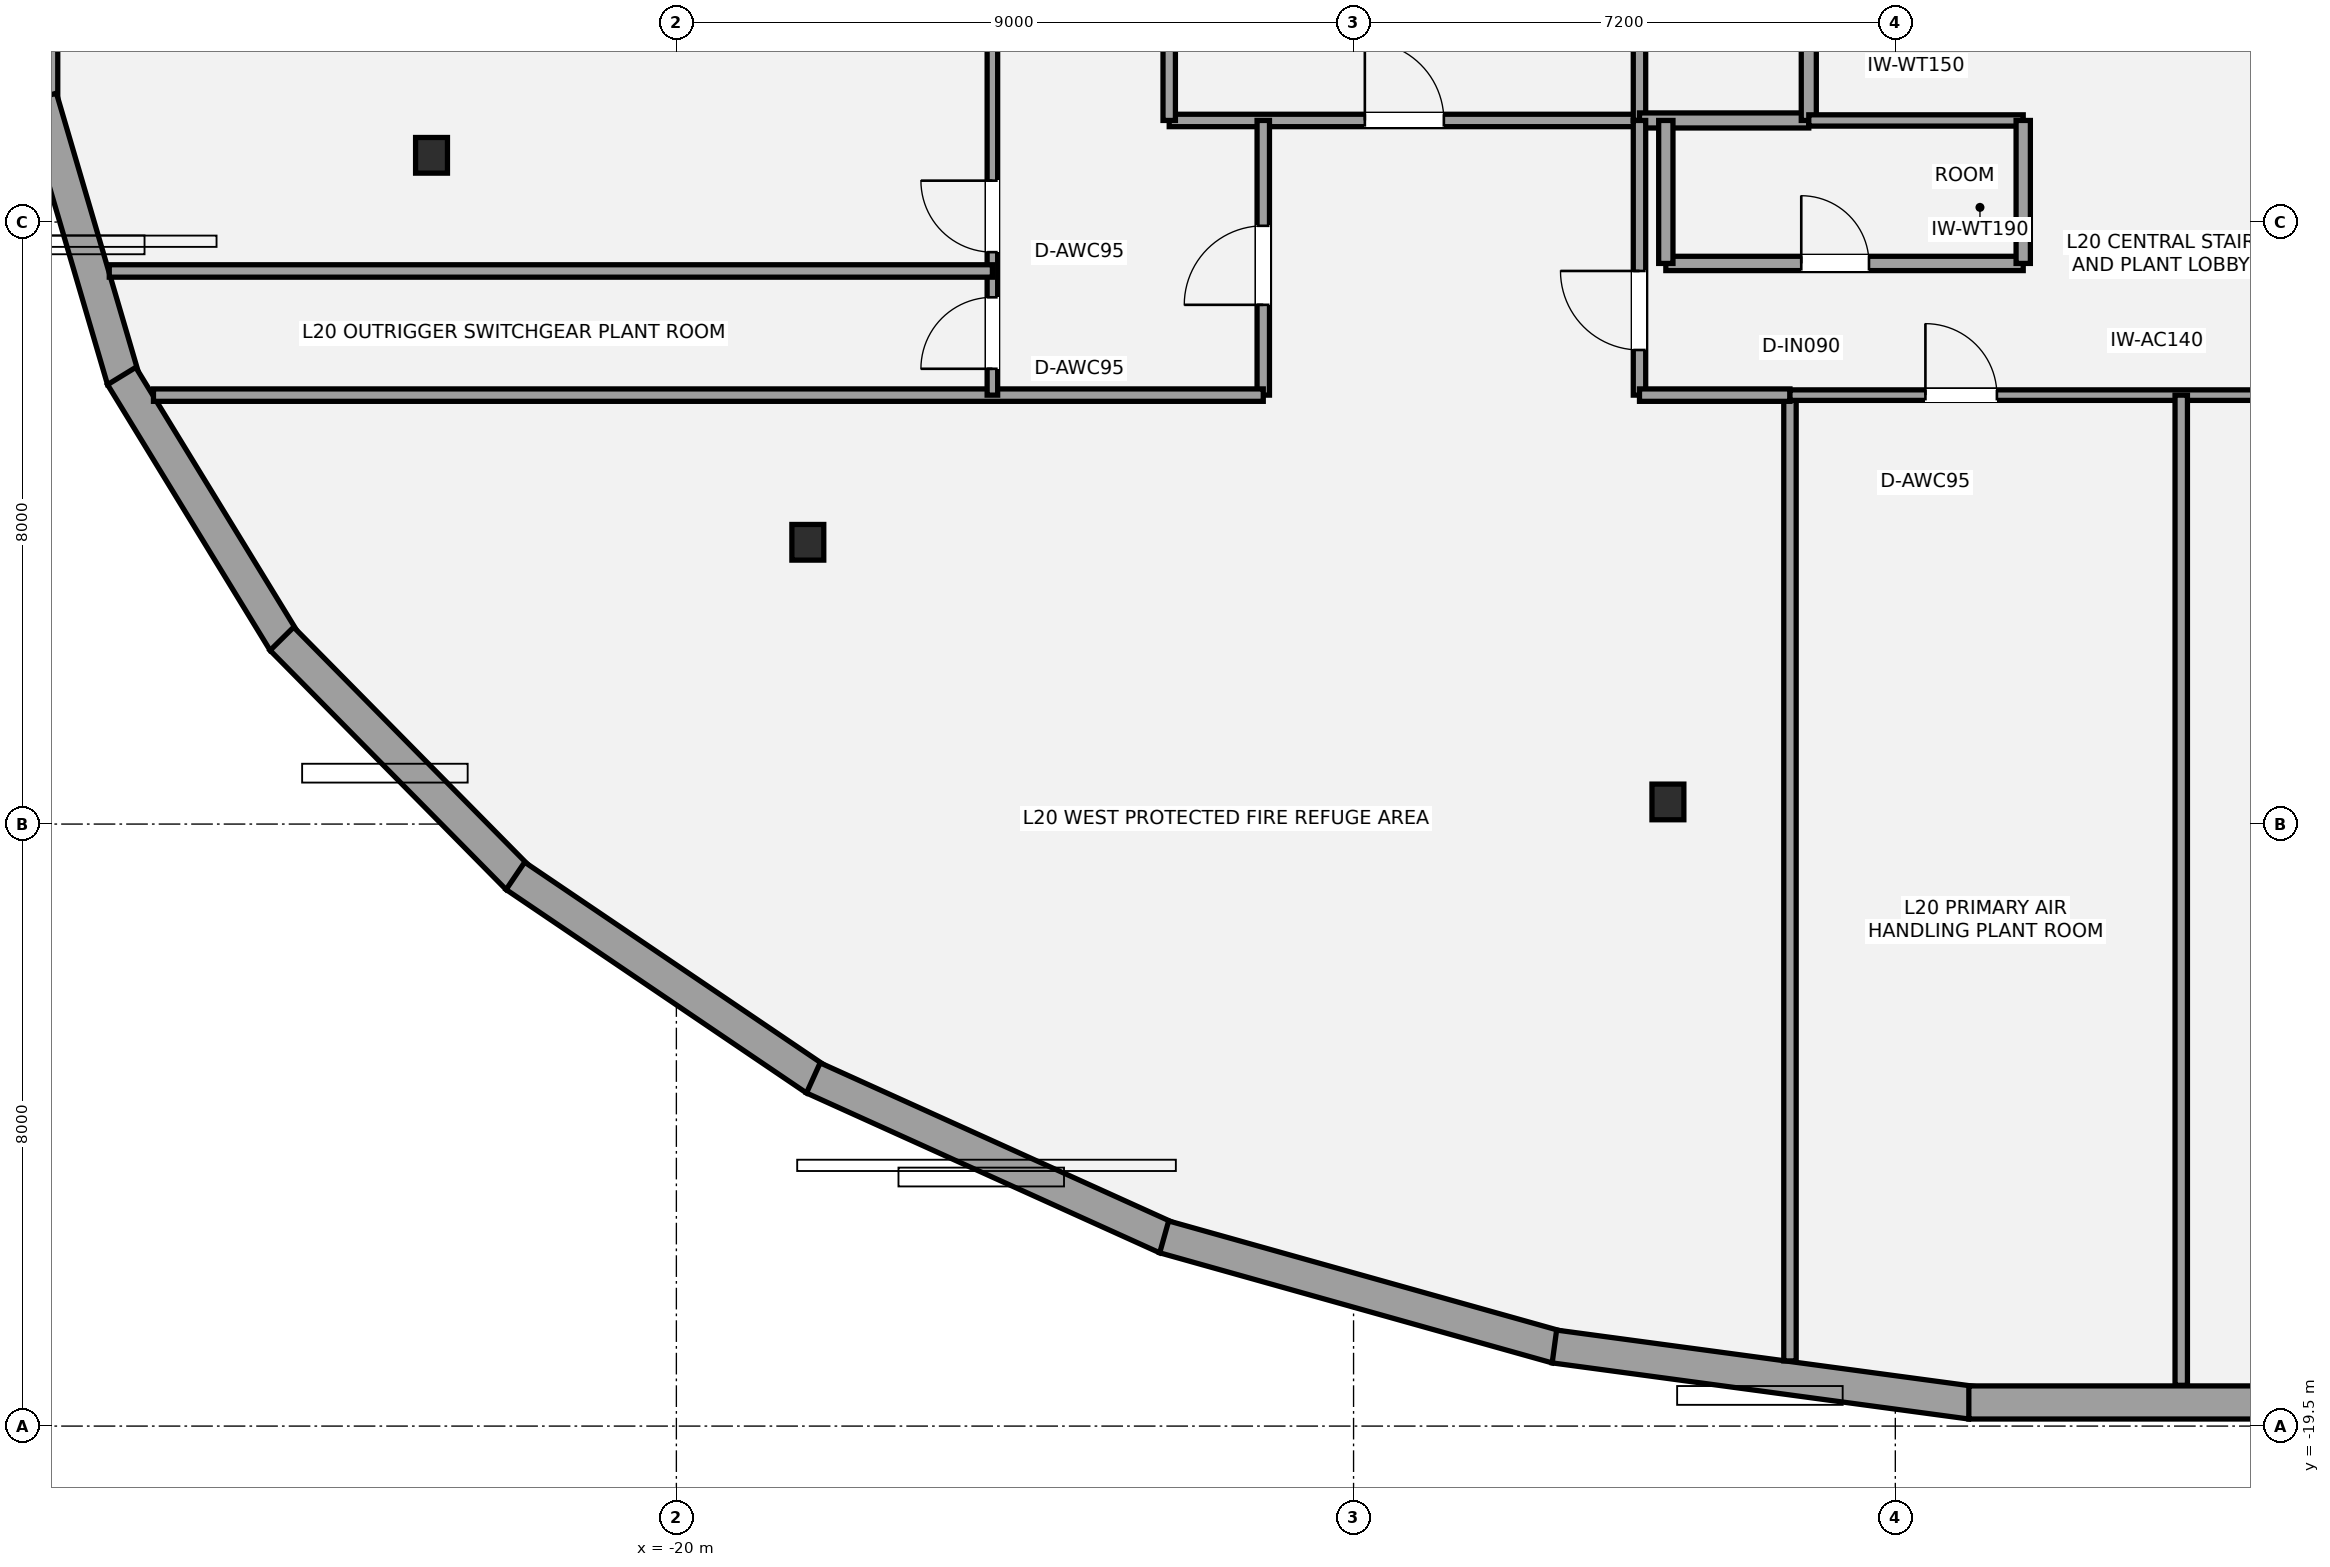
"""IFC4 building model, lengths in metres.
Left out: names, types, materials, properties, quantities, classifications, styles, units other than length and angle.
Written with IfcOpenShell. Run it as: python <this file> out.ifc"""

import sys

from ifc_helpers import new_model, si_unit, direction, frame, frame_2d, origin, origin_2d, place, context, subcontext, project, spatial, rectangle, i_section, extrude, element, fill, save


model = new_model("IFC4")
c1 = context("Model", 3, precision=1e-05, world=origin(), true_north=direction((0.0, 1.0)))
c2 = subcontext(c1, "Body", "Model", "MODEL_VIEW")
j1 = project(units=[si_unit("LENGTHUNIT", "METRE"), si_unit("PLANEANGLEUNIT", "RADIAN")], contexts=[c1])
p1 = place(None, origin())
s1 = spatial("IfcSite", under=j1, at=p1, CompositionType="ELEMENT")
p2 = place(p1, origin())
s2 = spatial("IfcBuilding", under=s1, at=p2, CompositionType="ELEMENT")
p3 = place(p2, frame((0.0, 0.0, 77.4)))
s3 = spatial("IfcBuildingStorey", under=s2, at=p3, CompositionType="ELEMENT", Elevation=77.4)
for number, where, z_axis, x_axis in (
    (1, (-23.254, -2.613, 0.0), (0.0, 0.0, 1.0), (1.0, 0.0, 0.0)),
    (2, (-18.253, -7.756, 0.0), (0.0, 0.0, 1.0), (1.0, 0.0, 0.0)),
    (3, (-6.822, -11.206, 0.0), (0.0, 0.0, 1.0), (1.0, 0.0, 0.0)),
):
    element("IfcColumn", number, at=place(p3, frame(where, z_axis=z_axis, x_axis=x_axis)), inside=s3, PredefinedType="COLUMN", context=c2, shape_type="SweptSolid", body=[
        extrude(i_section(OverallWidth=0.424, OverallDepth=0.474, WebThickness=0.048, FlangeThickness=0.077, at=origin_2d()), origin(), (0.0, 0.0, 1.0), 4.5),
    ])
p4 = place(p3, frame((-28.441, -1.911, 0.0), z_axis=(0.0, 0.0, 1.0), x_axis=(0.0, 1.0, 0.0)))
e4 = element("IfcWall", 4, at=p4, inside=s3, PredefinedType="STANDARD", context=c2, shape_type="SweptSolid", body=[
    extrude(rectangle(XDim=3.823, YDim=0.44, at=frame_2d((1.911, 0.0))), origin(), (0.0, 0.0, 1.0), 3.498),
])
p5 = place(p3, frame((-27.349, -5.599, 0.0), z_axis=(0.0, 0.0, 1.0), x_axis=(-0.281834819638, 0.959462940629, 0.0)))
e5 = element("IfcWall", 5, at=p5, inside=s3, PredefinedType="STANDARD", context=c2, shape_type="SweptSolid", body=[
    extrude(rectangle(XDim=3.908, YDim=0.44, at=frame_2d((1.954, 0.0))), origin(), (0.0, 0.0, 1.0), 3.498),
])
p6 = place(p3, frame((-25.212, -9.077, 0.0), z_axis=(0.0, 0.0, 1.0), x_axis=(-0.521891226532, 0.85301204427, 0.0)))
e6 = element("IfcWall", 6, at=p6, inside=s3, PredefinedType="STANDARD", context=c2, shape_type="SweptSolid", body=[
    extrude(rectangle(XDim=4.14, YDim=0.44, at=frame_2d((2.07, 0.0))), origin(), (0.0, 0.0, 1.0), 3.498),
])
p7 = place(p3, frame((-22.106, -12.216, 0.0), z_axis=(0.0, 0.0, 1.0), x_axis=(-0.702361901729, 0.711820032733, 0.0)))
e7 = element("IfcWall", 7, at=p7, inside=s3, PredefinedType="STANDARD", context=c2, shape_type="SweptSolid", body=[
    extrude(rectangle(XDim=4.466, YDim=0.44, at=frame_2d((2.233, 0.0))), origin(), (0.0, 0.0, 1.0), 3.498),
])
p8 = place(p3, frame((-18.147, -14.892, 0.0), z_axis=(0.0, 0.0, 1.0), x_axis=(-0.82804003003, 0.560668983151, 0.0)))
e8 = element("IfcWall", 8, at=p8, inside=s3, PredefinedType="STANDARD", context=c2, shape_type="SweptSolid", body=[
    extrude(rectangle(XDim=4.821, YDim=0.44, at=frame_2d((2.411, 0.0))), origin(), (0.0, 0.0, 1.0), 3.498),
])
p9 = place(p3, frame((-13.486, -16.997, 0.0), z_axis=(0.0, 0.0, 1.0), x_axis=(-0.911088856004, 0.412210014999, 0.0)))
e9 = element("IfcWall", 9, at=p9, inside=s3, PredefinedType="STANDARD", context=c2, shape_type="SweptSolid", body=[
    extrude(rectangle(XDim=5.152, YDim=0.44, at=frame_2d((2.576, 0.0))), origin(), (0.0, 0.0, 1.0), 3.498),
])
p10 = place(p3, frame((-8.301, -18.448, 0.0), z_axis=(0.0, 0.0, 1.0), x_axis=(-0.962849260033, 0.270039446109, 0.0)))
e10 = element("IfcWall", 10, at=p10, inside=s3, PredefinedType="STANDARD", context=c2, shape_type="SweptSolid", body=[
    extrude(rectangle(XDim=5.417, YDim=0.44, at=frame_2d((2.708, 0.0))), origin(), (0.0, 0.0, 1.0), 3.498),
])
p11 = place(p3, frame((-2.793, -19.188, 0.0), z_axis=(0.0, 0.0, 1.0), x_axis=(-0.9910561058, 0.133445851026, 0.0)))
e11 = element("IfcWall", 11, at=p11, inside=s3, PredefinedType="STANDARD", context=c2, shape_type="SweptSolid", body=[
    extrude(rectangle(XDim=5.587, YDim=0.44, at=frame_2d((2.794, 0.0))), origin(), (0.0, 0.0, 1.0), 3.498),
])
p12 = place(p3, frame((2.823, -19.186, 0.0), z_axis=(0.0, 0.0, 1.0), x_axis=(-1.0, 0.0, 0.0)))
e12 = element("IfcWall", 12, at=p12, inside=s3, PredefinedType="STANDARD", context=c2, shape_type="SweptSolid", body=[
    extrude(rectangle(XDim=5.646, YDim=0.44, at=frame_2d((2.823, 0.0))), origin(), (0.0, 0.0, 1.0), 3.498),
])
p13 = place(p3, frame((-13.45, -2.15, 0.0), z_axis=(0.0, 0.0, 1.0), x_axis=(1.0, 0.0, 0.0)))
e13 = element("IfcWall", 13, at=p13, inside=s3, PredefinedType="PARTITIONING", context=c2, shape_type="SweptSolid", body=[
    extrude(rectangle(XDim=6.25, YDim=0.165, at=frame_2d((3.125, 0.0))), origin(), (0.0, 0.0, 1.0), 3.733),
])
p14 = place(p13, frame((2.6, 0.0, 0.0)))
e14 = element("IfcOpeningElement", 14, at=p14, cuts=e13, PredefinedType="OPENING", context=c2, shape_type="SweptSolid", body=[
    extrude(rectangle(XDim=1.05, YDim=2.15, at=frame_2d((0.525, 1.075))), frame((0.0, 0.093, 0.0), z_axis=(0.0, -1.0, 0.0), x_axis=(1.0, 0.0, 0.0)), (0.0, 0.0, 1.0), 0.185),
])
p15 = place(p3, frame((-13.45, -2.15, 0.0), z_axis=(0.0, 0.0, 1.0), x_axis=(0.0, 1.0, 0.0)))
e15 = element("IfcWall", 15, at=p15, inside=s3, PredefinedType="PARTITIONING", context=c2, shape_type="SweptSolid", body=[
    extrude(rectangle(XDim=3.3, YDim=0.165, at=frame_2d((1.65, 0.0))), origin(), (0.0, 0.0, 1.0), 2.47),
])
p16 = place(p3, frame((-7.2, -2.15, 0.0), z_axis=(0.0, 0.0, 1.0), x_axis=(0.0, 1.0, 0.0)))
e16 = element("IfcWall", 16, at=p16, inside=s3, PredefinedType="PARTITIONING", context=c2, shape_type="SweptSolid", body=[
    extrude(rectangle(XDim=3.3, YDim=0.165, at=frame_2d((1.65, 0.0))), origin(), (0.0, 0.0, 1.0), 3.733),
])
p17 = place(p3, frame((-7.2, -2.15, 0.0), z_axis=(0.0, 0.0, 1.0), x_axis=(1.0, 0.0, 0.0)))
e17 = element("IfcWall", 17, at=p17, inside=s3, PredefinedType="SOLIDWALL", context=c2, shape_type="SweptSolid", body=[
    extrude(rectangle(XDim=2.25, YDim=0.2, at=frame_2d((1.125, 0.0))), origin(), (0.0, 0.0, 1.0), 2.47),
])
p18 = place(p3, frame((-4.95, -2.15, 0.0), z_axis=(0.0, 0.0, 1.0), x_axis=(0.0, 1.0, 0.0)))
e18 = element("IfcWall", 18, at=p18, inside=s3, PredefinedType="SOLIDWALL", context=c2, shape_type="SweptSolid", body=[
    extrude(rectangle(XDim=3.3, YDim=0.2, at=frame_2d((1.65, 0.0))), origin(), (0.0, 0.0, 1.0), 2.47),
])
p19 = place(p18, frame((0.95, 0.0, 0.0)))
e19 = element("IfcOpeningElement", 19, at=p19, cuts=e18, PredefinedType="OPENING", context=c2, shape_type="SweptSolid", body=[
    extrude(rectangle(XDim=0.75, YDim=2.1, at=frame_2d((0.375, 1.05))), frame((0.0, 0.11, 0.0), z_axis=(0.0, -1.0, 0.0), x_axis=(1.0, 0.0, 0.0)), (0.0, 0.0, 1.0), 0.22),
])
p20 = place(p3, frame((-6.85, -4.05, 0.0), z_axis=(0.0, 0.0, 1.0), x_axis=(1.0, 0.0, 0.0)))
e20 = element("IfcWall", 20, at=p20, inside=s3, PredefinedType="PLUMBINGWALL", context=c2, shape_type="SweptSolid", body=[
    extrude(rectangle(XDim=4.75, YDim=0.19, at=frame_2d((2.375, 0.0))), origin(), (0.0, 0.0, 1.0), 2.47),
])
p21 = place(p20, frame((1.8, 0.0, 0.0)))
e21 = element("IfcOpeningElement", 21, at=p21, cuts=e20, PredefinedType="OPENING", context=c2, shape_type="SweptSolid", body=[
    extrude(rectangle(XDim=0.9, YDim=2.1, at=frame_2d((0.45, 1.05))), frame((0.0, 0.105, 0.0), z_axis=(0.0, -1.0, 0.0), x_axis=(1.0, 0.0, 0.0)), (0.0, 0.0, 1.0), 0.21),
])
p22 = place(p3, frame((-4.95, -2.15, 0.0), z_axis=(0.0, 0.0, 1.0), x_axis=(1.0, 0.0, 0.0)))
e22 = element("IfcWall", 22, at=p22, inside=s3, PredefinedType="PLUMBINGWALL", context=c2, shape_type="SweptSolid", body=[
    extrude(rectangle(XDim=2.85, YDim=0.15, at=frame_2d((1.425, 0.0))), origin(), (0.0, 0.0, 1.0), 4.28),
])
for number, where, z_axis, x_axis in (
    (23, (-6.85, -4.05, 0.0), (0.0, 0.0, 1.0), (0.0, 1.0, 0.0)),
    (24, (-2.1, -4.05, 0.0), (0.0, 0.0, 1.0), (0.0, 1.0, 0.0)),
):
    element("IfcWall", number, at=place(p3, frame(where, z_axis=z_axis, x_axis=x_axis)), inside=s3, PredefinedType="PLUMBINGWALL", context=c2, shape_type="SweptSolid", body=[
        extrude(rectangle(XDim=1.9, YDim=0.19, at=frame_2d((0.95, 0.0))), origin(), (0.0, 0.0, 1.0), 4.28),
    ])
p23 = place(p3, frame((-12.2, -5.8, 0.0), z_axis=(0.0, 0.0, 1.0), x_axis=(0.0, 1.0, 0.0)))
e25 = element("IfcWall", 25, at=p23, inside=s3, PredefinedType="PARTITIONING", context=c2, shape_type="SweptSolid", body=[
    extrude(rectangle(XDim=3.65, YDim=0.165, at=frame_2d((1.825, 0.0))), origin(), (0.0, 0.0, 1.0), 4.28),
])
p24 = place(p23, frame((1.2, 0.0, 0.0)))
e26 = element("IfcOpeningElement", 26, at=p24, cuts=e25, PredefinedType="OPENING", context=c2, shape_type="SweptSolid", body=[
    extrude(rectangle(XDim=1.05, YDim=2.15, at=frame_2d((0.525, 1.075))), frame((0.0, 0.093, 0.0), z_axis=(0.0, -1.0, 0.0), x_axis=(1.0, 0.0, 0.0)), (0.0, 0.0, 1.0), 0.185),
])
p25 = place(p3, frame((-7.2, -5.8, 0.0), z_axis=(0.0, 0.0, 1.0), x_axis=(0.0, 1.0, 0.0)))
e27 = element("IfcWall", 27, at=p25, inside=s3, PredefinedType="PARTITIONING", context=c2, shape_type="SweptSolid", body=[
    extrude(rectangle(XDim=3.65, YDim=0.165, at=frame_2d((1.825, 0.0))), origin(), (0.0, 0.0, 1.0), 4.28),
])
p26 = place(p25, frame((0.6, 0.0, 0.0)))
e28 = element("IfcOpeningElement", 28, at=p26, cuts=e27, PredefinedType="OPENING", context=c2, shape_type="SweptSolid", body=[
    extrude(rectangle(XDim=1.05, YDim=2.15, at=frame_2d((0.525, 1.075))), frame((0.0, 0.093, 0.0), z_axis=(0.0, -1.0, 0.0), x_axis=(1.0, 0.0, 0.0)), (0.0, 0.0, 1.0), 0.185),
])
p27 = place(p3, frame((-5.2, -18.634, 0.0), z_axis=(0.0, 0.0, 1.0), x_axis=(0.0, 1.0, 0.0)))
e29 = element("IfcWall", 29, at=p27, inside=s3, PredefinedType="PARTITIONING", context=c2, shape_type="SweptSolid", body=[
    extrude(rectangle(XDim=12.834, YDim=0.165, at=frame_2d((6.417, 0.0))), origin(), (0.0, 0.0, 1.0), 4.28),
])
p28 = place(p3, frame((-26.949, -5.8, 0.0), z_axis=(0.0, 0.0, 1.0), x_axis=(1.0, 0.0, 0.0)))
e30 = element("IfcWall", 30, at=p28, inside=s3, PredefinedType="PARTITIONING", context=c2, shape_type="SweptSolid", body=[
    extrude(rectangle(XDim=14.75, YDim=0.165, at=frame_2d((7.375, 0.0))), origin(), (0.0, 0.0, 1.0), 2.47),
])
p29 = place(p3, frame((-7.2, -5.8, 0.0), z_axis=(0.0, 0.0, 1.0), x_axis=(1.0, 0.0, 0.0)))
e31 = element("IfcWall", 31, at=p29, inside=s3, PredefinedType="PARTITIONING", context=c2, shape_type="SweptSolid", body=[
    extrude(rectangle(XDim=2.0, YDim=0.165, at=frame_2d((1.0, 0.0))), origin(), (0.0, 0.0, 1.0), 2.47),
])
p30 = place(p3, frame((-5.2, -5.8, 0.0), z_axis=(0.0, 0.0, 1.0), x_axis=(1.0, 0.0, 0.0)))
e32 = element("IfcWall", 32, at=p30, inside=s3, PredefinedType="PARTITIONING", context=c2, shape_type="SweptSolid", body=[
    extrude(rectangle(XDim=10.4, YDim=0.14, at=frame_2d((5.2, 0.0))), origin(), (0.0, 0.0, 1.0), 4.28),
])
p31 = place(p30, frame((1.8, 0.0, 0.0)))
e33 = element("IfcOpeningElement", 33, at=p31, cuts=e32, PredefinedType="OPENING", context=c2, shape_type="SweptSolid", body=[
    extrude(rectangle(XDim=0.95, YDim=2.15, at=frame_2d((0.475, 1.075))), frame((0.0, 0.08, 0.0), z_axis=(0.0, -1.0, 0.0), x_axis=(1.0, 0.0, 0.0)), (0.0, 0.0, 1.0), 0.16),
])
p32 = place(p30, frame((7.0, 0.0, 0.0)))
e34 = element("IfcOpeningElement", 34, at=p32, cuts=e32, PredefinedType="OPENING", context=c2, shape_type="SweptSolid", body=[
    extrude(rectangle(XDim=0.95, YDim=2.15, at=frame_2d((0.475, 1.075))), frame((0.0, 0.08, 0.0), z_axis=(0.0, -1.0, 0.0), x_axis=(1.0, 0.0, 0.0)), (0.0, 0.0, 1.0), 0.16),
])
p33 = place(p3, frame((-15.8, -5.8, 0.0), z_axis=(0.0, 0.0, 1.0), x_axis=(0.0, 1.0, 0.0)))
e35 = element("IfcWall", 35, at=p33, inside=s3, PredefinedType="PARTITIONING", context=c2, shape_type="SweptSolid", body=[
    extrude(rectangle(XDim=11.2, YDim=0.14, at=frame_2d((5.6, 0.0))), origin(), (0.0, 0.0, 1.0), 2.47),
])
p34 = place(p33, frame((0.35, 0.0, 0.0)))
e36 = element("IfcOpeningElement", 36, at=p34, cuts=e35, PredefinedType="OPENING", context=c2, shape_type="SweptSolid", body=[
    extrude(rectangle(XDim=0.95, YDim=2.15, at=frame_2d((0.475, 1.075))), frame((0.0, 0.08, 0.0), z_axis=(0.0, -1.0, 0.0), x_axis=(1.0, 0.0, 0.0)), (0.0, 0.0, 1.0), 0.16),
])
p35 = place(p33, frame((1.9, 0.0, 0.0)))
e37 = element("IfcOpeningElement", 37, at=p35, cuts=e35, PredefinedType="OPENING", context=c2, shape_type="SweptSolid", body=[
    extrude(rectangle(XDim=0.95, YDim=2.15, at=frame_2d((0.475, 1.075))), frame((0.0, 0.08, 0.0), z_axis=(0.0, -1.0, 0.0), x_axis=(1.0, 0.0, 0.0)), (0.0, 0.0, 1.0), 0.16),
])
p36 = place(p3, frame((0.0, -18.958, 0.0), z_axis=(0.0, 0.0, 1.0), x_axis=(0.0, 1.0, 0.0)))
e38 = element("IfcWall", 38, at=p36, inside=s3, PredefinedType="PARTITIONING", context=c2, shape_type="SweptSolid", body=[
    extrude(rectangle(XDim=13.158, YDim=0.165, at=frame_2d((6.579, 0.0))), origin(), (0.0, 0.0, 1.0), 4.28),
])
p37 = place(p3, frame((-27.537, -4.15, 0.0), z_axis=(0.0, 0.0, 1.0), x_axis=(1.0, 0.0, 0.0)))
e39 = element("IfcWall", 39, at=p37, inside=s3, PredefinedType="PARTITIONING", context=c2, shape_type="SweptSolid", body=[
    extrude(rectangle(XDim=11.737, YDim=0.165, at=frame_2d((5.868, 0.0))), origin(), (0.0, 0.0, 1.0), 2.47),
])
p38 = place(p21, origin())
e40 = element("IfcDoor", 40, at=p38, inside=s3, OperationType="SINGLE_SWING_LEFT", PredefinedType="DOOR", context=c2, shape_type="SweptSolid", body=[
    extrude(rectangle(XDim=0.9, YDim=2.1, at=frame_2d((0.45, 1.05))), frame((0.0, 0.025, 0.0), z_axis=(0.0, -1.0, 0.0), x_axis=(1.0, 0.0, 0.0)), (0.0, 0.0, 1.0), 0.05),
])
fill(e21, e40)
p39 = place(p14, origin())
e41 = element("IfcDoor", 41, at=p39, inside=s3, OperationType="SINGLE_SWING_LEFT", PredefinedType="DOOR", context=c2, shape_type="SweptSolid", body=[
    extrude(rectangle(XDim=1.05, YDim=2.15, at=frame_2d((0.525, 1.075))), frame((0.0, 0.025, 0.0), z_axis=(0.0, -1.0, 0.0), x_axis=(1.0, 0.0, 0.0)), (0.0, 0.0, 1.0), 0.05),
])
fill(e14, e41)
p40 = place(p24, origin())
e42 = element("IfcDoor", 42, at=p40, inside=s3, OperationType="SINGLE_SWING_LEFT", PredefinedType="DOOR", context=c2, shape_type="SweptSolid", body=[
    extrude(rectangle(XDim=1.05, YDim=2.15, at=frame_2d((0.525, 1.075))), frame((0.0, 0.025, 0.0), z_axis=(0.0, -1.0, 0.0), x_axis=(1.0, 0.0, 0.0)), (0.0, 0.0, 1.0), 0.05),
])
fill(e26, e42)
p41 = place(p26, origin())
e43 = element("IfcDoor", 43, at=p41, inside=s3, OperationType="SINGLE_SWING_RIGHT", PredefinedType="DOOR", context=c2, shape_type="SweptSolid", body=[
    extrude(rectangle(XDim=1.05, YDim=2.15, at=frame_2d((0.525, 1.075))), frame((0.0, 0.025, 0.0), z_axis=(0.0, -1.0, 0.0), x_axis=(1.0, 0.0, 0.0)), (0.0, 0.0, 1.0), 0.05),
])
fill(e28, e43)
p42 = place(p31, origin())
e44 = element("IfcDoor", 44, at=p42, inside=s3, OperationType="SINGLE_SWING_LEFT", PredefinedType="DOOR", context=c2, shape_type="SweptSolid", body=[
    extrude(rectangle(XDim=0.95, YDim=2.15, at=frame_2d((0.475, 1.075))), frame((0.0, 0.025, 0.0), z_axis=(0.0, -1.0, 0.0), x_axis=(1.0, 0.0, 0.0)), (0.0, 0.0, 1.0), 0.05),
])
fill(e33, e44)
p43 = place(p34, origin())
e45 = element("IfcDoor", 45, at=p43, inside=s3, OperationType="SINGLE_SWING_LEFT", PredefinedType="DOOR", context=c2, shape_type="SweptSolid", body=[
    extrude(rectangle(XDim=0.95, YDim=2.15, at=frame_2d((0.475, 1.075))), frame((0.0, 0.025, 0.0), z_axis=(0.0, -1.0, 0.0), x_axis=(1.0, 0.0, 0.0)), (0.0, 0.0, 1.0), 0.05),
])
fill(e36, e45)
p44 = place(p35, origin())
e46 = element("IfcDoor", 46, at=p44, inside=s3, OperationType="SINGLE_SWING_RIGHT", PredefinedType="DOOR", context=c2, shape_type="SweptSolid", body=[
    extrude(rectangle(XDim=0.95, YDim=2.15, at=frame_2d((0.475, 1.075))), frame((0.0, 0.025, 0.0), z_axis=(0.0, -1.0, 0.0), x_axis=(1.0, 0.0, 0.0)), (0.0, 0.0, 1.0), 0.05),
])
fill(e37, e46)
save(model, sys.argv[1])
